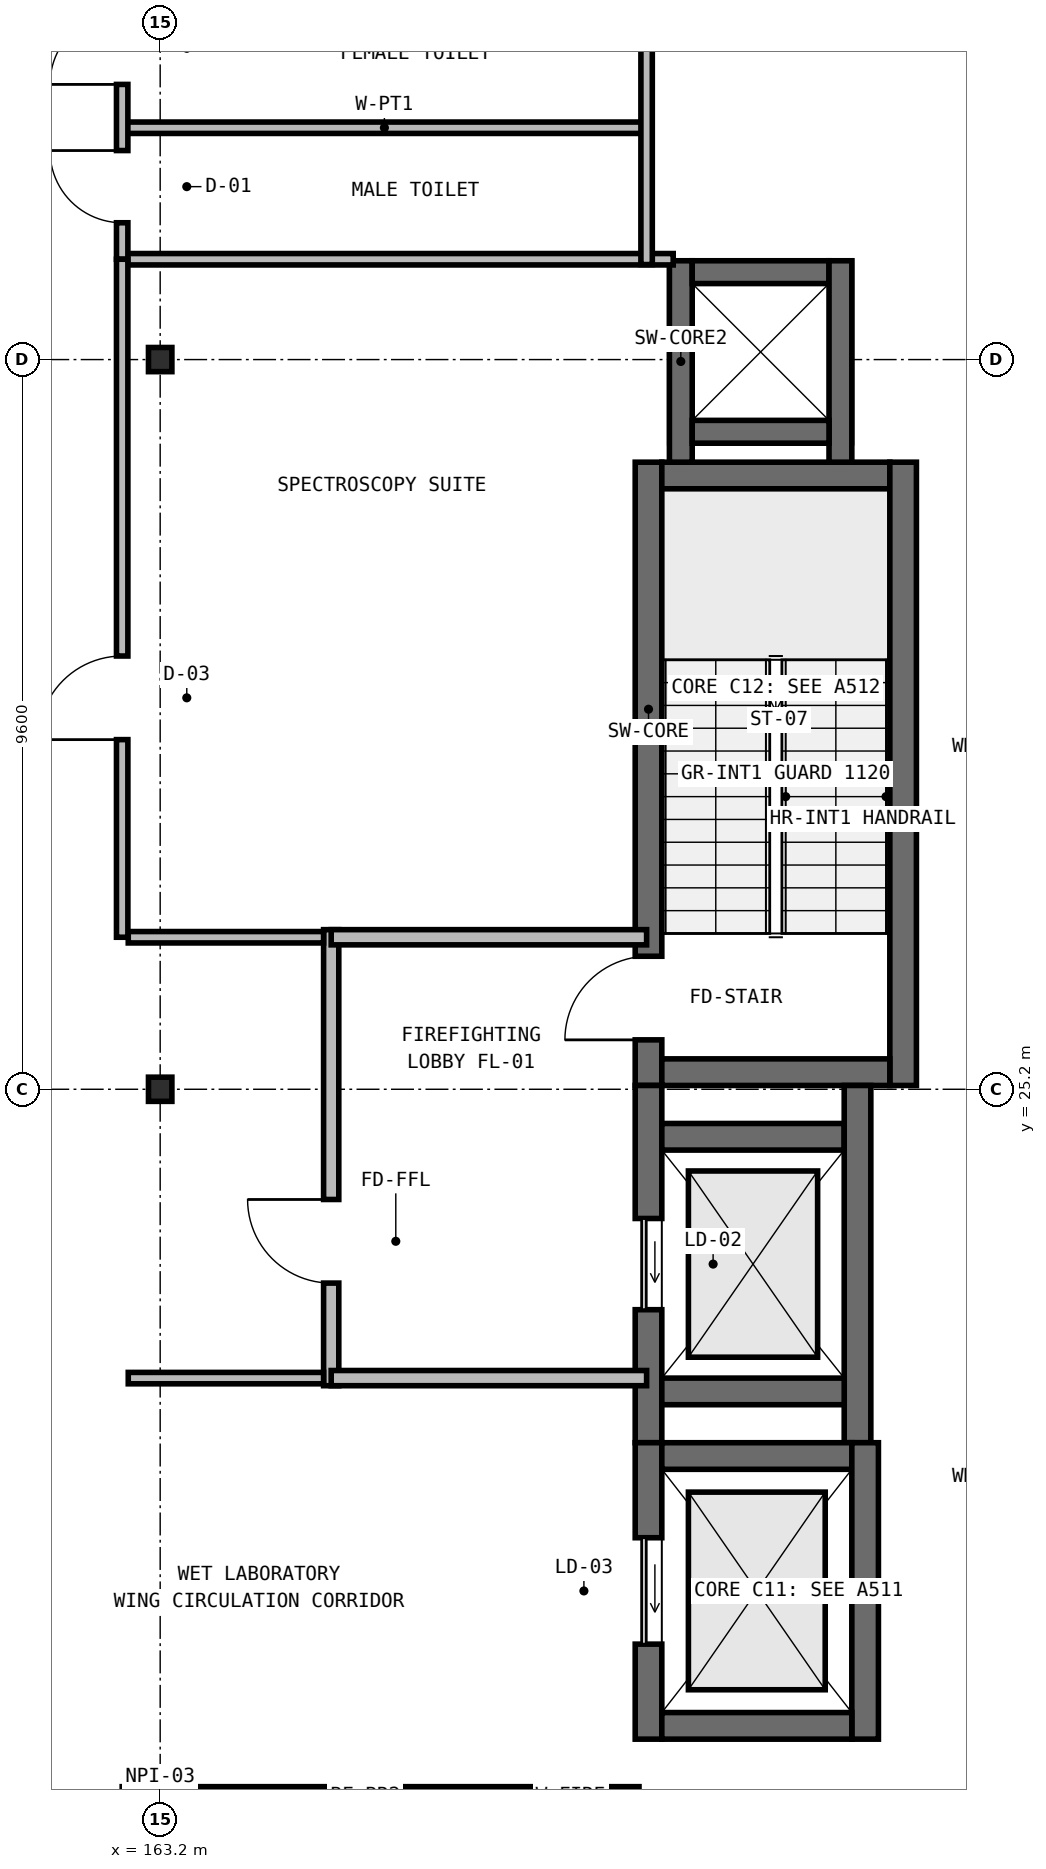
"""IFC4 building model, lengths in metres.
Left out: names, types, materials, properties, quantities, classifications, styles, units other than length and angle.
Written with IfcOpenShell. Run it as: python <this file> out.ifc"""

import sys

from ifc_helpers import new_model, si_unit, direction, frame, frame_2d, origin, origin_2d, place, context, subcontext, project, spatial, rectangle, i_section, extrude, element, fill, save


model = new_model("IFC4")
c1 = context("Model", 3, precision=1e-05, world=origin(), true_north=direction((0.0, 1.0)))
c2 = subcontext(c1, "Body", "Model", "MODEL_VIEW")
j1 = project(units=[si_unit("LENGTHUNIT", "METRE"), si_unit("PLANEANGLEUNIT", "RADIAN")], contexts=[c1])
p1 = place(None, origin())
s1 = spatial("IfcSite", under=j1, at=p1, CompositionType="ELEMENT")
p2 = place(p1, origin())
s2 = spatial("IfcBuilding", under=s1, at=p2, CompositionType="ELEMENT")
p3 = place(p2, frame((0.0, 0.0, 37.1)))
s3 = spatial("IfcBuildingStorey", under=s2, at=p3, CompositionType="ELEMENT", Elevation=37.1)
p4 = place(p3, frame((169.625, 25.25, 0.0), z_axis=(0.0, 0.0, 1.0), x_axis=(0.0, 1.0, 0.0)))
e1 = element("IfcWall", 1, at=p4, inside=s3, PredefinedType="SHEAR", context=c2, shape_type="SweptSolid", body=[
    extrude(rectangle(XDim=8.2, YDim=0.35, at=frame_2d((4.1, 0.0))), origin(), (0.0, 0.0, 1.0), 4.55),
])
p5 = place(p4, frame((0.6, 0.0, 0.0)))
e2 = element("IfcOpeningElement", 2, at=p5, cuts=e1, PredefinedType="OPENING", context=c2, shape_type="SweptSolid", body=[
    extrude(rectangle(XDim=1.1, YDim=2.15, at=frame_2d((0.55, 1.075))), frame((0.0, 0.185, 0.0), z_axis=(0.0, -1.0, 0.0), x_axis=(1.0, 0.0, 0.0)), (0.0, 0.0, 1.0), 0.37),
])
p6 = place(p3, frame((169.8, 33.275, 0.0), z_axis=(0.0, 0.0, 1.0), x_axis=(1.0, 0.0, 0.0)))
e3 = element("IfcWall", 3, at=p6, inside=s3, PredefinedType="SHEAR", context=c2, shape_type="SweptSolid", body=[
    extrude(rectangle(XDim=3.0, YDim=0.35, at=frame_2d((1.5, 0.0))), origin(), (0.0, 0.0, 1.0), 4.55),
])
p7 = place(p3, frame((172.975, 33.45, 0.0), z_axis=(0.0, 0.0, 1.0), x_axis=(0.0, -1.0, 0.0)))
e4 = element("IfcWall", 4, at=p7, inside=s3, PredefinedType="SHEAR", context=c2, shape_type="SweptSolid", body=[
    extrude(rectangle(XDim=8.2, YDim=0.35, at=frame_2d((4.1, 0.0))), origin(), (0.0, 0.0, 1.0), 4.55),
])
p8 = place(p3, frame((172.8, 25.425, 0.0), z_axis=(0.0, 0.0, 1.0), x_axis=(-1.0, 0.0, 0.0)))
e5 = element("IfcWall", 5, at=p8, inside=s3, PredefinedType="SHEAR", context=c2, shape_type="SweptSolid", body=[
    extrude(rectangle(XDim=3.0, YDim=0.35, at=frame_2d((1.5, 0.0))), origin(), (0.0, 0.0, 1.0), 4.55),
])
p9 = place(p3, frame((169.625, 20.55, 0.0), z_axis=(0.0, 0.0, 1.0), x_axis=(0.0, 1.0, 0.0)))
e6 = element("IfcWall", 6, at=p9, inside=s3, PredefinedType="SHEAR", context=c2, shape_type="SweptSolid", body=[
    extrude(rectangle(XDim=4.7, YDim=0.35, at=frame_2d((2.35, 0.0))), origin(), (0.0, 0.0, 1.0), 4.55),
])
p10 = place(p9, frame((1.75, 0.0, 0.0)))
e7 = element("IfcOpeningElement", 7, at=p10, cuts=e6, PredefinedType="OPENING", context=c2, shape_type="SweptSolid", body=[
    extrude(rectangle(XDim=1.2, YDim=2.15, at=frame_2d((0.6, 1.075))), frame((0.0, 0.185, 0.0), z_axis=(0.0, -1.0, 0.0), x_axis=(1.0, 0.0, 0.0)), (0.0, 0.0, 1.0), 0.37),
])
p11 = place(p3, frame((169.8, 24.575, 0.0), z_axis=(0.0, 0.0, 1.0), x_axis=(1.0, 0.0, 0.0)))
e8 = element("IfcWall", 8, at=p11, inside=s3, PredefinedType="SHEAR", context=c2, shape_type="SweptSolid", body=[
    extrude(rectangle(XDim=2.4, YDim=0.35, at=frame_2d((1.2, 0.0))), origin(), (0.0, 0.0, 1.0), 4.55),
])
p12 = place(p3, frame((172.375, 25.25, 0.0), z_axis=(0.0, 0.0, 1.0), x_axis=(0.0, -1.0, 0.0)))
e9 = element("IfcWall", 9, at=p12, inside=s3, PredefinedType="SHEAR", context=c2, shape_type="SweptSolid", body=[
    extrude(rectangle(XDim=4.7, YDim=0.35, at=frame_2d((2.35, 0.0))), origin(), (0.0, 0.0, 1.0), 4.55),
])
p13 = place(p3, frame((172.2, 21.225, 0.0), z_axis=(0.0, 0.0, 1.0), x_axis=(-1.0, 0.0, 0.0)))
e10 = element("IfcWall", 10, at=p13, inside=s3, PredefinedType="SHEAR", context=c2, shape_type="SweptSolid", body=[
    extrude(rectangle(XDim=2.4, YDim=0.35, at=frame_2d((1.2, 0.0))), origin(), (0.0, 0.0, 1.0), 4.55),
])
p14 = place(p3, frame((169.625, 16.65, 0.0), z_axis=(0.0, 0.0, 1.0), x_axis=(0.0, 1.0, 0.0)))
e11 = element("IfcWall", 11, at=p14, inside=s3, PredefinedType="SHEAR", context=c2, shape_type="SweptSolid", body=[
    extrude(rectangle(XDim=3.9, YDim=0.35, at=frame_2d((1.95, 0.0))), origin(), (0.0, 0.0, 1.0), 4.55),
])
p15 = place(p14, frame((1.25, 0.0, 0.0)))
e12 = element("IfcOpeningElement", 12, at=p15, cuts=e11, PredefinedType="OPENING", context=c2, shape_type="SweptSolid", body=[
    extrude(rectangle(XDim=1.4, YDim=2.3, at=frame_2d((0.7, 1.15))), frame((0.0, 0.185, 0.0), z_axis=(0.0, -1.0, 0.0), x_axis=(1.0, 0.0, 0.0)), (0.0, 0.0, 1.0), 0.37),
])
p16 = place(p3, frame((169.8, 20.375, 0.0), z_axis=(0.0, 0.0, 1.0), x_axis=(1.0, 0.0, 0.0)))
e13 = element("IfcWall", 13, at=p16, inside=s3, PredefinedType="SHEAR", context=c2, shape_type="SweptSolid", body=[
    extrude(rectangle(XDim=2.5, YDim=0.35, at=frame_2d((1.25, 0.0))), origin(), (0.0, 0.0, 1.0), 4.55),
])
p17 = place(p3, frame((172.475, 20.55, 0.0), z_axis=(0.0, 0.0, 1.0), x_axis=(0.0, -1.0, 0.0)))
e14 = element("IfcWall", 14, at=p17, inside=s3, PredefinedType="SHEAR", context=c2, shape_type="SweptSolid", body=[
    extrude(rectangle(XDim=3.9, YDim=0.35, at=frame_2d((1.95, 0.0))), origin(), (0.0, 0.0, 1.0), 4.55),
])
p18 = place(p3, frame((172.3, 16.825, 0.0), z_axis=(0.0, 0.0, 1.0), x_axis=(-1.0, 0.0, 0.0)))
e15 = element("IfcWall", 15, at=p18, inside=s3, PredefinedType="SHEAR", context=c2, shape_type="SweptSolid", body=[
    extrude(rectangle(XDim=2.5, YDim=0.35, at=frame_2d((1.25, 0.0))), origin(), (0.0, 0.0, 1.0), 4.55),
])
for number, where, z_axis, x_axis in (
    (16, (163.2, 25.2, 0.0), (0.0, 0.0, 1.0), (1.0, 0.0, 0.0)),
    (17, (163.2, 34.8, 0.0), (0.0, 0.0, 1.0), (1.0, 0.0, 0.0)),
):
    element("IfcColumn", number, at=place(p3, frame(where, z_axis=z_axis, x_axis=x_axis)), inside=s3, PredefinedType="COLUMN", context=c2, shape_type="SweptSolid", body=[
        extrude(i_section(OverallWidth=0.308, OverallDepth=0.318, WebThickness=0.013, FlangeThickness=0.021, at=origin_2d()), origin(), (0.0, 0.0, 1.0), 4.55),
    ])
p19 = place(p3, frame((170.05, 33.45, 0.0), z_axis=(0.0, 0.0, 1.0), x_axis=(0.0, 1.0, 0.0)))
e18 = element("IfcWall", 18, at=p19, inside=s3, PredefinedType="SHEAR", context=c2, shape_type="SweptSolid", body=[
    extrude(rectangle(XDim=2.65, YDim=0.3, at=frame_2d((1.325, 0.0))), origin(), (0.0, 0.0, 1.0), 4.37),
])
p20 = place(p3, frame((170.2, 35.95, 0.0), z_axis=(0.0, 0.0, 1.0), x_axis=(1.0, 0.0, 0.0)))
e19 = element("IfcWall", 19, at=p20, inside=s3, PredefinedType="SHEAR", context=c2, shape_type="SweptSolid", body=[
    extrude(rectangle(XDim=1.8, YDim=0.3, at=frame_2d((0.9, 0.0))), origin(), (0.0, 0.0, 1.0), 4.37),
])
p21 = place(p3, frame((172.15, 36.1, 0.0), z_axis=(0.0, 0.0, 1.0), x_axis=(0.0, -1.0, 0.0)))
e20 = element("IfcWall", 20, at=p21, inside=s3, PredefinedType="SHEAR", context=c2, shape_type="SweptSolid", body=[
    extrude(rectangle(XDim=2.65, YDim=0.3, at=frame_2d((1.325, 0.0))), origin(), (0.0, 0.0, 1.0), 4.37),
])
p22 = place(p3, frame((172.0, 33.85, 0.0), z_axis=(0.0, 0.0, 1.0), x_axis=(-1.0, 0.0, 0.0)))
e21 = element("IfcWall", 21, at=p22, inside=s3, PredefinedType="SHEAR", context=c2, shape_type="SweptSolid", body=[
    extrude(rectangle(XDim=1.8, YDim=0.3, at=frame_2d((0.9, 0.0))), origin(), (0.0, 0.0, 1.0), 4.37),
])
p23 = place(p3, frame((165.45, 21.3, 0.0), z_axis=(0.0, 0.0, 1.0), x_axis=(0.0, 1.0, 0.0)))
e22 = element("IfcWall", 22, at=p23, inside=s3, PredefinedType="SOLIDWALL", context=c2, shape_type="SweptSolid", body=[
    extrude(rectangle(XDim=6.0, YDim=0.2, at=frame_2d((3.0, 0.0))), origin(), (0.0, 0.0, 1.0), 4.3),
])
p24 = place(p23, frame((1.35, 0.0, 0.0)))
e23 = element("IfcOpeningElement", 23, at=p24, cuts=e22, PredefinedType="OPENING", context=c2, shape_type="SweptSolid", body=[
    extrude(rectangle(XDim=1.1, YDim=2.15, at=frame_2d((0.55, 1.075))), frame((0.0, 0.11, 0.0), z_axis=(0.0, -1.0, 0.0), x_axis=(1.0, 0.0, 0.0)), (0.0, 0.0, 1.0), 0.22),
])
for number, where, z_axis, x_axis in (
    (24, (165.45, 21.4, 0.0), (0.0, 0.0, 1.0), (1.0, 0.0, 0.0)),
    (25, (165.45, 27.2, 0.0), (0.0, 0.0, 1.0), (1.0, 0.0, 0.0)),
):
    element("IfcWall", number, at=place(p3, frame(where, z_axis=z_axis, x_axis=x_axis)), inside=s3, PredefinedType="SOLIDWALL", context=c2, shape_type="SweptSolid", body=[
        extrude(rectangle(XDim=4.15, YDim=0.2, at=frame_2d((2.075, 0.0))), origin(), (0.0, 0.0, 1.0), 4.3),
    ])
p25 = place(p3, frame((162.7, 37.85, 0.0), z_axis=(0.0, 0.0, 1.0), x_axis=(1.0, 0.0, 0.0)))
e26 = element("IfcWall", 26, at=p25, inside=s3, PredefinedType="PARTITIONING", context=c2, shape_type="SweptSolid", body=[
    extrude(rectangle(XDim=6.9, YDim=0.15, at=frame_2d((3.45, 0.0))), origin(), (0.0, 0.0, 1.0), 4.3),
])
p26 = place(p3, frame((162.7, 36.12, 0.0), z_axis=(0.0, 0.0, 1.0), x_axis=(1.0, 0.0, 0.0)))
e27 = element("IfcWall", 27, at=p26, inside=s3, PredefinedType="PARTITIONING", context=c2, shape_type="SweptSolid", body=[
    extrude(rectangle(XDim=7.25, YDim=0.15, at=frame_2d((3.625, 0.0))), origin(), (0.0, 0.0, 1.0), 4.3),
])
p27 = place(p3, frame((169.6, 36.05, 0.0), z_axis=(0.0, 0.0, 1.0), x_axis=(0.0, 1.0, 0.0)))
e28 = element("IfcWall", 28, at=p27, inside=s3, PredefinedType="PARTITIONING", context=c2, shape_type="SweptSolid", body=[
    extrude(rectangle(XDim=5.5, YDim=0.15, at=frame_2d((2.75, 0.0))), origin(), (0.0, 0.0, 1.0), 4.3),
])
p28 = place(p3, frame((162.7, 36.12, 0.0), z_axis=(0.0, 0.0, 1.0), x_axis=(0.0, 1.0, 0.0)))
e29 = element("IfcWall", 29, at=p28, inside=s3, PredefinedType="PARTITIONING", context=c2, shape_type="SweptSolid", body=[
    extrude(rectangle(XDim=5.4, YDim=0.15, at=frame_2d((2.7, 0.0))), origin(), (0.0, 0.0, 1.0), 4.3),
])
p29 = place(p28, frame((0.48, 0.0, 0.0)))
e30 = element("IfcOpeningElement", 30, at=p29, cuts=e29, PredefinedType="OPENING", context=c2, shape_type="SweptSolid", body=[
    extrude(rectangle(XDim=0.95, YDim=2.1, at=frame_2d((0.475, 1.05))), frame((0.0, 0.085, 0.0), z_axis=(0.0, -1.0, 0.0), x_axis=(1.0, 0.0, 0.0)), (0.0, 0.0, 1.0), 0.17),
])
p30 = place(p28, frame((2.3, 0.0, 0.0)))
e31 = element("IfcOpeningElement", 31, at=p30, cuts=e29, PredefinedType="OPENING", context=c2, shape_type="SweptSolid", body=[
    extrude(rectangle(XDim=0.95, YDim=2.1, at=frame_2d((0.475, 1.05))), frame((0.0, 0.085, 0.0), z_axis=(0.0, -1.0, 0.0), x_axis=(1.0, 0.0, 0.0)), (0.0, 0.0, 1.0), 0.17),
])
p31 = place(p28, frame((4.1, 0.0, 0.0)))
e32 = element("IfcOpeningElement", 32, at=p31, cuts=e29, PredefinedType="OPENING", context=c2, shape_type="SweptSolid", body=[
    extrude(rectangle(XDim=0.95, YDim=2.1, at=frame_2d((0.475, 1.05))), frame((0.0, 0.085, 0.0), z_axis=(0.0, -1.0, 0.0), x_axis=(1.0, 0.0, 0.0)), (0.0, 0.0, 1.0), 0.17),
])
p32 = place(p3, frame((162.78, 27.2, 0.0), z_axis=(0.0, 0.0, 1.0), x_axis=(1.0, 0.0, 0.0)))
e33 = element("IfcWall", 33, at=p32, inside=s3, PredefinedType="PARTITIONING", context=c2, shape_type="SweptSolid", body=[
    extrude(rectangle(XDim=2.57, YDim=0.15, at=frame_2d((1.285, 0.0))), origin(), (0.0, 0.0, 1.0), 4.3),
])
p33 = place(p3, frame((162.7, 27.2, 0.0), z_axis=(0.0, 0.0, 1.0), x_axis=(0.0, 1.0, 0.0)))
e34 = element("IfcWall", 34, at=p33, inside=s3, PredefinedType="PARTITIONING", context=c2, shape_type="SweptSolid", body=[
    extrude(rectangle(XDim=8.92, YDim=0.15, at=frame_2d((4.46, 0.0))), origin(), (0.0, 0.0, 1.0), 4.3),
])
p34 = place(p33, frame((2.6, 0.0, 0.0)))
e35 = element("IfcOpeningElement", 35, at=p34, cuts=e34, PredefinedType="OPENING", context=c2, shape_type="SweptSolid", body=[
    extrude(rectangle(XDim=1.1, YDim=2.2, at=frame_2d((0.55, 1.1))), frame((0.0, 0.085, 0.0), z_axis=(0.0, -1.0, 0.0), x_axis=(1.0, 0.0, 0.0)), (0.0, 0.0, 1.0), 0.17),
])
p35 = place(p3, frame((162.78, 21.4, 0.0), z_axis=(0.0, 0.0, 1.0), x_axis=(1.0, 0.0, 0.0)))
e36 = element("IfcWall", 36, at=p35, inside=s3, PredefinedType="PARTITIONING", context=c2, shape_type="SweptSolid", body=[
    extrude(rectangle(XDim=2.57, YDim=0.15, at=frame_2d((1.285, 0.0))), origin(), (0.0, 0.0, 1.0), 4.3),
])
p36 = place(p3, frame((162.7, 15.95, 0.0), z_axis=(0.0, 0.0, 1.0), x_axis=(1.0, 0.0, 0.0)))
e37 = element("IfcWall", 37, at=p36, inside=s3, PredefinedType="PARTITIONING", context=c2, shape_type="SweptSolid", body=[
    extrude(rectangle(XDim=6.8, YDim=0.15, at=frame_2d((3.4, 0.0))), origin(), (0.0, 0.0, 1.0), 4.3),
])
p37 = place(p5, origin())
e38 = element("IfcDoor", 38, at=p37, inside=s3, OperationType="SINGLE_SWING_LEFT", PredefinedType="DOOR", context=c2, shape_type="SweptSolid", body=[
    extrude(rectangle(XDim=1.1, YDim=2.15, at=frame_2d((0.55, 1.075))), frame((0.0, 0.025, 0.0), z_axis=(0.0, -1.0, 0.0), x_axis=(1.0, 0.0, 0.0)), (0.0, 0.0, 1.0), 0.05),
])
fill(e2, e38)
p38 = place(p10, origin())
e39 = element("IfcDoor", 39, at=p38, inside=s3, OperationType="SLIDING_TO_LEFT", PredefinedType="USERDEFINED", context=c2, shape_type="SweptSolid", body=[
    extrude(rectangle(XDim=1.2, YDim=2.15, at=frame_2d((0.6, 1.075))), frame((0.0, 0.025, 0.0), z_axis=(0.0, -1.0, 0.0), x_axis=(1.0, 0.0, 0.0)), (0.0, 0.0, 1.0), 0.05),
])
fill(e7, e39)
p39 = place(p15, origin())
e40 = element("IfcDoor", 40, at=p39, inside=s3, OperationType="SLIDING_TO_LEFT", PredefinedType="USERDEFINED", context=c2, shape_type="SweptSolid", body=[
    extrude(rectangle(XDim=1.4, YDim=2.3, at=frame_2d((0.7, 1.15))), frame((0.0, 0.025, 0.0), z_axis=(0.0, -1.0, 0.0), x_axis=(1.0, 0.0, 0.0)), (0.0, 0.0, 1.0), 0.05),
])
fill(e12, e40)
p40 = place(p24, origin())
e41 = element("IfcDoor", 41, at=p40, inside=s3, OperationType="SINGLE_SWING_RIGHT", PredefinedType="DOOR", context=c2, shape_type="SweptSolid", body=[
    extrude(rectangle(XDim=1.1, YDim=2.15, at=frame_2d((0.55, 1.075))), frame((0.0, 0.025, 0.0), z_axis=(0.0, -1.0, 0.0), x_axis=(1.0, 0.0, 0.0)), (0.0, 0.0, 1.0), 0.05),
])
fill(e23, e41)
p41 = place(p29, origin())
e42 = element("IfcDoor", 42, at=p41, inside=s3, OperationType="SINGLE_SWING_RIGHT", PredefinedType="DOOR", context=c2, shape_type="SweptSolid", body=[
    extrude(rectangle(XDim=0.95, YDim=2.1, at=frame_2d((0.475, 1.05))), frame((0.0, 0.025, 0.0), z_axis=(0.0, -1.0, 0.0), x_axis=(1.0, 0.0, 0.0)), (0.0, 0.0, 1.0), 0.05),
])
fill(e30, e42)
p42 = place(p30, origin())
e43 = element("IfcDoor", 43, at=p42, inside=s3, OperationType="SINGLE_SWING_LEFT", PredefinedType="DOOR", context=c2, shape_type="SweptSolid", body=[
    extrude(rectangle(XDim=0.95, YDim=2.1, at=frame_2d((0.475, 1.05))), frame((0.0, 0.025, 0.0), z_axis=(0.0, -1.0, 0.0), x_axis=(1.0, 0.0, 0.0)), (0.0, 0.0, 1.0), 0.05),
])
fill(e31, e43)
p43 = place(p34, origin())
e44 = element("IfcDoor", 44, at=p43, inside=s3, OperationType="SINGLE_SWING_LEFT", PredefinedType="DOOR", context=c2, shape_type="SweptSolid", body=[
    extrude(rectangle(XDim=1.1, YDim=2.2, at=frame_2d((0.55, 1.1))), frame((0.0, 0.025, 0.0), z_axis=(0.0, -1.0, 0.0), x_axis=(1.0, 0.0, 0.0)), (0.0, 0.0, 1.0), 0.05),
])
fill(e35, e44)
save(model, sys.argv[1])
